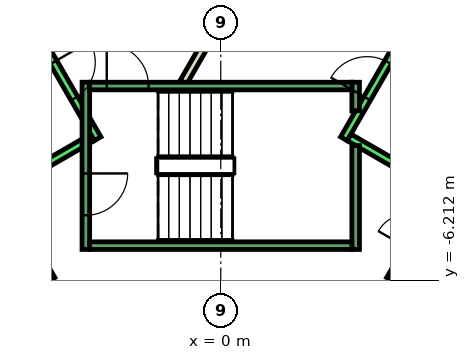
"""IFC4 building model, lengths in metres.
Left out: names, types, materials, properties, quantities, classifications, styles, units other than length and angle.
Written with IfcOpenShell. Run it as: python <this file> out.ifc"""

import sys

from ifc_helpers import new_model, si_unit, direction, frame, frame_2d, origin, place, context, subcontext, project, spatial, rectangle, extrude, element, fill, save


model = new_model("IFC4")
c1 = context("Model", 3, precision=1e-05, world=origin(), true_north=direction((0.0, 1.0)))
c2 = subcontext(c1, "Body", "Model", "MODEL_VIEW")
j1 = project(units=[si_unit("LENGTHUNIT", "METRE"), si_unit("PLANEANGLEUNIT", "RADIAN")], contexts=[c1])
p1 = place(None, origin())
s1 = spatial("IfcSite", under=j1, at=p1, CompositionType="ELEMENT")
p2 = place(p1, origin())
s2 = spatial("IfcBuilding", under=s1, at=p2, CompositionType="ELEMENT")
p3 = place(p2, frame((0.0, 0.0, 236.0)))
s3 = spatial("IfcBuildingStorey", under=s2, at=p3, CompositionType="ELEMENT", Elevation=236.0)
p4 = place(p3, frame((4.451, -6.19, 0.0), z_axis=(0.0, 0.0, 1.0), x_axis=(0.500011755427, 0.866018616679, 0.0)))
e1 = element("IfcWall", 1, at=p4, inside=s3, PredefinedType="PARTITIONING", context=c2, shape_type="SweptSolid", body=[
    extrude(rectangle(XDim=2.8, YDim=0.2, at=frame_2d((1.4, 0.0))), origin(), (0.0, 0.0, 1.0), 4.8),
])
p5 = place(p4, frame((0.95, 0.0, 0.0)))
e2 = element("IfcOpeningElement", 2, at=p5, cuts=e1, PredefinedType="OPENING", context=c2, shape_type="SweptSolid", body=[
    extrude(rectangle(XDim=0.9, YDim=2.1, at=frame_2d((0.45, 1.05))), frame((0.0, 0.11, 0.0), z_axis=(0.0, -1.0, 0.0), x_axis=(1.0, 0.0, 0.0)), (0.0, 0.0, 1.0), 0.22),
])
p6 = place(p3, frame((-5.851, -3.765, 0.0), z_axis=(0.0, 0.0, 1.0), x_axis=(0.500011755427, -0.866018616679, 0.0)))
e3 = element("IfcWall", 3, at=p6, inside=s3, PredefinedType="PARTITIONING", context=c2, shape_type="SweptSolid", body=[
    extrude(rectangle(XDim=2.8, YDim=0.2, at=frame_2d((1.4, 0.0))), origin(), (0.0, 0.0, 1.0), 4.8),
])
p7 = place(p6, frame((0.95, 0.0, 0.0)))
e4 = element("IfcOpeningElement", 4, at=p7, cuts=e3, PredefinedType="OPENING", context=c2, shape_type="SweptSolid", body=[
    extrude(rectangle(XDim=0.9, YDim=2.1, at=frame_2d((0.45, 1.05))), frame((0.0, 0.11, 0.0), z_axis=(0.0, -1.0, 0.0), x_axis=(1.0, 0.0, 0.0)), (0.0, 0.0, 1.0), 0.22),
])
p8 = place(p3, frame((-0.982, -1.0, 0.0), z_axis=(0.0, 0.0, 1.0), x_axis=(0.50024047865, 0.865886518847, 0.0)))
e5 = element("IfcWall", 5, at=p8, inside=s3, PredefinedType="PARTITIONING", context=c2, shape_type="SweptSolid", body=[
    extrude(rectangle(XDim=1.863, YDim=0.2, at=frame_2d((0.931, 0.0))), origin(), (0.0, 0.0, 1.0), 4.8),
])
p9 = place(p3, frame((-5.94, 2.188, 0.0), z_axis=(0.0, 0.0, 1.0), x_axis=(0.500034260056, -0.866005622828, 0.0)))
e6 = element("IfcWall", 6, at=p9, inside=s3, PredefinedType="STANDARD", context=c2, shape_type="SweptSolid", body=[
    extrude(rectangle(XDim=5.399, YDim=0.2, at=frame_2d((2.7, 0.0))), origin(), (0.0, 0.0, 1.0), 4.8),
])
p10 = place(p9, frame((3.075, 0.0, 0.0)))
e7 = element("IfcOpeningElement", 7, at=p10, cuts=e6, PredefinedType="OPENING", context=c2, shape_type="SweptSolid", body=[
    extrude(rectangle(XDim=1.1, YDim=2.1, at=frame_2d((0.55, 1.05))), frame((0.0, 0.11, 0.0), z_axis=(0.0, -1.0, 0.0), x_axis=(1.0, 0.0, 0.0)), (0.0, 0.0, 1.0), 0.22),
])
p11 = place(p9, frame((1.225, 0.0, 0.0)))
e8 = element("IfcOpeningElement", 8, at=p11, cuts=e6, PredefinedType="OPENING", context=c2, shape_type="SweptSolid", body=[
    extrude(rectangle(XDim=1.1, YDim=2.1, at=frame_2d((0.55, 1.05))), frame((0.0, 0.11, 0.0), z_axis=(0.0, -1.0, 0.0), x_axis=(1.0, 0.0, 0.0)), (0.0, 0.0, 1.0), 0.22),
])
p12 = place(p3, frame((-3.377, -2.452, 0.0), z_axis=(0.0, 0.0, 1.0), x_axis=(-0.865955154139, -0.50012165622, 0.0)))
e9 = element("IfcWall", 9, at=p12, inside=s3, PredefinedType="STANDARD", context=c2, shape_type="SweptSolid", body=[
    extrude(rectangle(XDim=2.4, YDim=0.2, at=frame_2d((1.2, 0.0))), origin(), (0.0, 0.0, 1.0), 4.8),
])
p13 = place(p3, frame((3.24, -2.488, 0.0), z_axis=(0.0, 0.0, 1.0), x_axis=(0.500034260056, 0.866005622828, 0.0)))
e10 = element("IfcWall", 10, at=p13, inside=s3, PredefinedType="STANDARD", context=c2, shape_type="SweptSolid", body=[
    extrude(rectangle(XDim=5.399, YDim=0.2, at=frame_2d((2.7, 0.0))), origin(), (0.0, 0.0, 1.0), 4.8),
])
p14 = place(p13, frame((3.225, 0.0, 0.0)))
e11 = element("IfcOpeningElement", 11, at=p14, cuts=e10, PredefinedType="OPENING", context=c2, shape_type="SweptSolid", body=[
    extrude(rectangle(XDim=1.1, YDim=2.1, at=frame_2d((0.55, 1.05))), frame((0.0, 0.11, 0.0), z_axis=(0.0, -1.0, 0.0), x_axis=(1.0, 0.0, 0.0)), (0.0, 0.0, 1.0), 0.22),
])
p15 = place(p13, frame((1.225, 0.0, 0.0)))
e12 = element("IfcOpeningElement", 12, at=p15, cuts=e10, PredefinedType="OPENING", context=c2, shape_type="SweptSolid", body=[
    extrude(rectangle(XDim=1.1, YDim=2.1, at=frame_2d((0.55, 1.05))), frame((0.0, 0.11, 0.0), z_axis=(0.0, -1.0, 0.0), x_axis=(1.0, 0.0, 0.0)), (0.0, 0.0, 1.0), 0.22),
])
p16 = place(p3, frame((3.377, -2.452, 0.0), z_axis=(0.0, 0.0, 1.0), x_axis=(0.865955154139, -0.50012165622, 0.0)))
e13 = element("IfcWall", 13, at=p16, inside=s3, PredefinedType="STANDARD", context=c2, shape_type="SweptSolid", body=[
    extrude(rectangle(XDim=2.4, YDim=0.2, at=frame_2d((1.2, 0.0))), origin(), (0.0, 0.0, 1.0), 4.8),
])
p17 = place(p3, frame((-3.55, -1.0, 0.0), z_axis=(0.0, 0.0, 1.0), x_axis=(0.0, -1.0, 0.0)))
e14 = element("IfcWall", 14, at=p17, inside=s3, PredefinedType="STANDARD", context=c2, shape_type="SweptSolid", body=[
    extrude(rectangle(XDim=4.4, YDim=0.2, at=frame_2d((2.2, 0.0))), origin(), (0.0, 0.0, 1.0), 4.8),
])
p18 = place(p17, frame((2.4, 0.0, 0.0)))
e15 = element("IfcOpeningElement", 15, at=p18, cuts=e14, PredefinedType="OPENING", context=c2, shape_type="SweptSolid", body=[
    extrude(rectangle(XDim=1.1, YDim=2.2, at=frame_2d((0.55, 1.1))), frame((0.0, 0.11, 0.0), z_axis=(0.0, -1.0, 0.0), x_axis=(1.0, 0.0, 0.0)), (0.0, 0.0, 1.0), 0.22),
])
p19 = place(p3, frame((3.55, -2.667, 0.0), z_axis=(0.0, 0.0, 1.0), x_axis=(0.0, -1.0, 0.0)))
e16 = element("IfcWall", 16, at=p19, inside=s3, PredefinedType="STANDARD", context=c2, shape_type="SweptSolid", body=[
    extrude(rectangle(XDim=2.733, YDim=0.2, at=frame_2d((1.366, 0.0))), origin(), (0.0, 0.0, 1.0), 4.8),
])
p20 = place(p3, frame((3.55, -1.0, 0.0), z_axis=(0.0, 0.0, 1.0), x_axis=(0.0, -1.0, 0.0)))
e17 = element("IfcWall", 17, at=p20, inside=s3, PredefinedType="STANDARD", context=c2, shape_type="SweptSolid", body=[
    extrude(rectangle(XDim=0.751, YDim=0.2, at=frame_2d((0.375, 0.0))), origin(), (0.0, 0.0, 1.0), 4.8),
])
p21 = place(p3, frame((-3.45, -1.1, 0.0), z_axis=(0.0, 0.0, 1.0), x_axis=(1.0, 0.0, 0.0)))
e18 = element("IfcWall", 18, at=p21, inside=s3, PredefinedType="STANDARD", context=c2, shape_type="SweptSolid", body=[
    extrude(rectangle(XDim=6.9, YDim=0.2, at=frame_2d((3.45, 0.0))), origin(), (0.0, 0.0, 1.0), 4.8),
])
p22 = place(p21, frame((0.45, 0.0, 0.0)))
e19 = element("IfcOpeningElement", 19, at=p22, cuts=e18, PredefinedType="OPENING", context=c2, shape_type="SweptSolid", body=[
    extrude(rectangle(XDim=1.1, YDim=2.2, at=frame_2d((0.55, 1.1))), frame((0.0, 0.11, 0.0), z_axis=(0.0, -1.0, 0.0), x_axis=(1.0, 0.0, 0.0)), (0.0, 0.0, 1.0), 0.22),
])
p23 = place(p3, frame((-3.45, -5.3, 0.0), z_axis=(0.0, 0.0, 1.0), x_axis=(1.0, 0.0, 0.0)))
e20 = element("IfcWall", 20, at=p23, inside=s3, PredefinedType="STANDARD", context=c2, shape_type="SweptSolid", body=[
    extrude(rectangle(XDim=6.9, YDim=0.2, at=frame_2d((3.45, 0.0))), origin(), (0.0, 0.0, 1.0), 4.8),
])
p24 = place(p10, origin())
e21 = element("IfcDoor", 21, at=p24, inside=s3, OperationType="SLIDING_TO_LEFT", PredefinedType="DOOR", context=c2, shape_type="SweptSolid", body=[
    extrude(rectangle(XDim=1.1, YDim=2.1, at=frame_2d((0.55, 1.05))), frame((0.0, 0.025, 0.0), z_axis=(0.0, -1.0, 0.0), x_axis=(1.0, 0.0, 0.0)), (0.0, 0.0, 1.0), 0.05),
])
fill(e7, e21)
p25 = place(p15, origin())
e22 = element("IfcDoor", 22, at=p25, inside=s3, OperationType="SLIDING_TO_LEFT", PredefinedType="DOOR", context=c2, shape_type="SweptSolid", body=[
    extrude(rectangle(XDim=1.1, YDim=2.1, at=frame_2d((0.55, 1.05))), frame((0.0, 0.025, 0.0), z_axis=(0.0, -1.0, 0.0), x_axis=(1.0, 0.0, 0.0)), (0.0, 0.0, 1.0), 0.05),
])
fill(e12, e22)
p26 = place(p22, origin())
e23 = element("IfcDoor", 23, at=p26, inside=s3, OperationType="SINGLE_SWING_LEFT", PredefinedType="DOOR", context=c2, shape_type="SweptSolid", body=[
    extrude(rectangle(XDim=1.1, YDim=2.2, at=frame_2d((0.55, 1.1))), frame((0.0, 0.025, 0.0), z_axis=(0.0, -1.0, 0.0), x_axis=(1.0, 0.0, 0.0)), (0.0, 0.0, 1.0), 0.05),
])
fill(e19, e23)
p27 = place(p18, origin())
e24 = element("IfcDoor", 24, at=p27, inside=s3, OperationType="SINGLE_SWING_LEFT", PredefinedType="DOOR", context=c2, shape_type="SweptSolid", body=[
    extrude(rectangle(XDim=1.1, YDim=2.2, at=frame_2d((0.55, 1.1))), frame((0.0, 0.025, 0.0), z_axis=(0.0, -1.0, 0.0), x_axis=(1.0, 0.0, 0.0)), (0.0, 0.0, 1.0), 0.05),
])
fill(e15, e24)
save(model, sys.argv[1])
